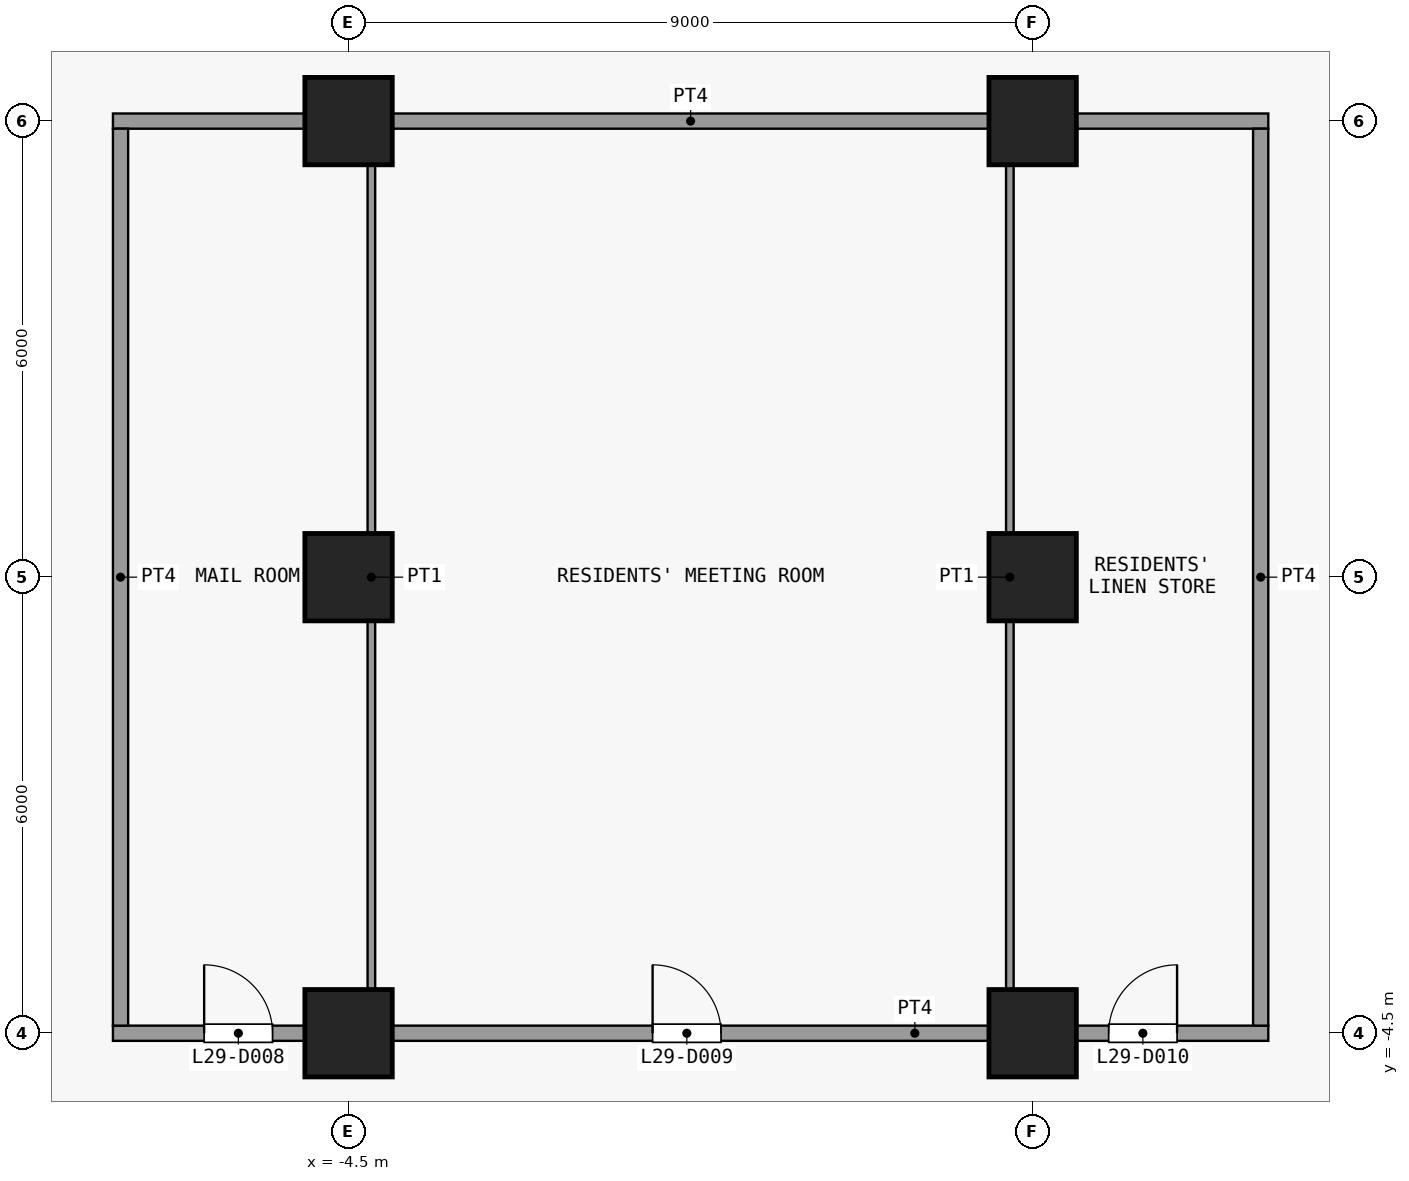
"""IFC4 building model, lengths in metres.
Left out: names, types, materials, properties, quantities, classifications, styles, units other than length and angle.
Written with IfcOpenShell. Run it as: python <this file> out.ifc"""

import sys

from ifc_helpers import new_model, si_unit, direction, frame, frame_2d, origin, origin_2d, place, context, subcontext, project, spatial, rectangle, extrude, element, fill, save


model = new_model("IFC4")
c1 = context("Model", 3, precision=1e-05, world=origin(), true_north=direction((0.0, 1.0)))
c2 = subcontext(c1, "Body", "Model", "MODEL_VIEW")
j1 = project(units=[si_unit("LENGTHUNIT", "METRE"), si_unit("PLANEANGLEUNIT", "RADIAN")], contexts=[c1])
p1 = place(None, origin())
s1 = spatial("IfcSite", under=j1, at=p1, CompositionType="ELEMENT")
p2 = place(p1, origin())
s2 = spatial("IfcBuilding", under=s1, at=p2, CompositionType="ELEMENT")
p3 = place(p2, frame((0.0, 0.0, 117.1)))
s3 = spatial("IfcBuildingStorey", under=s2, at=p3, CompositionType="ELEMENT", Elevation=117.1)
for number, where, z_axis, x_axis in (
    (1, (-4.5, -4.5, 0.0), (0.0, 0.0, 1.0), (1.0, 0.0, 0.0)),
    (2, (-4.5, 1.5, 0.0), (0.0, 0.0, 1.0), (1.0, 0.0, 0.0)),
    (3, (-4.5, 7.5, 0.0), (0.0, 0.0, 1.0), (1.0, 0.0, 0.0)),
    (4, (4.5, -4.5, 0.0), (0.0, 0.0, 1.0), (1.0, 0.0, 0.0)),
    (5, (4.5, 1.5, 0.0), (0.0, 0.0, 1.0), (1.0, 0.0, 0.0)),
    (6, (4.5, 7.5, 0.0), (0.0, 0.0, 1.0), (1.0, 0.0, 0.0)),
):
    element("IfcColumn", number, at=place(p3, frame(where, z_axis=z_axis, x_axis=x_axis)), inside=s3, PredefinedType="COLUMN", context=c2, shape_type="SweptSolid", body=[
        extrude(rectangle(XDim=1.15, YDim=1.15, at=origin_2d()), origin(), (0.0, 0.0, 1.0), 3.6),
    ])
p4 = place(p3, frame((-7.6, -4.5, 0.0), z_axis=(0.0, 0.0, 1.0), x_axis=(1.0, 0.0, 0.0)))
e7 = element("IfcWall", 7, at=p4, inside=s3, PredefinedType="PARTITIONING", context=c2, shape_type="SweptSolid", body=[
    extrude(rectangle(XDim=15.2, YDim=0.2, at=frame_2d((7.6, 0.0))), origin(), (0.0, 0.0, 1.0), 3.3),
])
p5 = place(p4, frame((1.2, 0.0, 0.0)))
e8 = element("IfcOpeningElement", 8, at=p5, cuts=e7, PredefinedType="OPENING", context=c2, shape_type="SweptSolid", body=[
    extrude(rectangle(XDim=0.9, YDim=2.1, at=frame_2d((0.45, 1.05))), frame((0.0, 0.11, 0.0), z_axis=(0.0, -1.0, 0.0), x_axis=(1.0, 0.0, 0.0)), (0.0, 0.0, 1.0), 0.22),
])
p6 = place(p4, frame((7.1, 0.0, 0.0)))
e9 = element("IfcOpeningElement", 9, at=p6, cuts=e7, PredefinedType="OPENING", context=c2, shape_type="SweptSolid", body=[
    extrude(rectangle(XDim=0.9, YDim=2.1, at=frame_2d((0.45, 1.05))), frame((0.0, 0.11, 0.0), z_axis=(0.0, -1.0, 0.0), x_axis=(1.0, 0.0, 0.0)), (0.0, 0.0, 1.0), 0.22),
])
p7 = place(p4, frame((13.1, 0.0, 0.0)))
e10 = element("IfcOpeningElement", 10, at=p7, cuts=e7, PredefinedType="OPENING", context=c2, shape_type="SweptSolid", body=[
    extrude(rectangle(XDim=0.9, YDim=2.1, at=frame_2d((0.45, 1.05))), frame((0.0, 0.11, 0.0), z_axis=(0.0, -1.0, 0.0), x_axis=(1.0, 0.0, 0.0)), (0.0, 0.0, 1.0), 0.22),
])
p8 = place(p3, frame((-7.6, 7.5, 0.0), z_axis=(0.0, 0.0, 1.0), x_axis=(1.0, 0.0, 0.0)))
e11 = element("IfcWall", 11, at=p8, inside=s3, PredefinedType="PARTITIONING", context=c2, shape_type="SweptSolid", body=[
    extrude(rectangle(XDim=15.2, YDim=0.2, at=frame_2d((7.6, 0.0))), origin(), (0.0, 0.0, 1.0), 3.3),
])
p9 = place(p3, frame((-7.5, -4.4, 0.0), z_axis=(0.0, 0.0, 1.0), x_axis=(0.0, 1.0, 0.0)))
e12 = element("IfcWall", 12, at=p9, inside=s3, PredefinedType="PARTITIONING", context=c2, shape_type="SweptSolid", body=[
    extrude(rectangle(XDim=11.8, YDim=0.2, at=frame_2d((5.9, 0.0))), origin(), (0.0, 0.0, 1.0), 3.3),
])
for number, where, z_axis, x_axis in (
    (13, (-4.2, -4.4, 0.0), (0.0, 0.0, 1.0), (0.0, 1.0, 0.0)),
    (14, (4.2, -4.4, 0.0), (0.0, 0.0, 1.0), (0.0, 1.0, 0.0)),
):
    element("IfcWall", number, at=place(p3, frame(where, z_axis=z_axis, x_axis=x_axis)), inside=s3, PredefinedType="PARTITIONING", context=c2, shape_type="SweptSolid", body=[
        extrude(rectangle(XDim=11.8, YDim=0.1, at=frame_2d((5.9, 0.0))), origin(), (0.0, 0.0, 1.0), 3.3),
    ])
p10 = place(p3, frame((7.5, -4.4, 0.0), z_axis=(0.0, 0.0, 1.0), x_axis=(0.0, 1.0, 0.0)))
e15 = element("IfcWall", 15, at=p10, inside=s3, PredefinedType="PARTITIONING", context=c2, shape_type="SweptSolid", body=[
    extrude(rectangle(XDim=11.8, YDim=0.2, at=frame_2d((5.9, 0.0))), origin(), (0.0, 0.0, 1.0), 3.3),
])
p11 = place(p5, origin())
e16 = element("IfcDoor", 16, at=p11, inside=s3, OperationType="SINGLE_SWING_RIGHT", PredefinedType="DOOR", context=c2, shape_type="SweptSolid", body=[
    extrude(rectangle(XDim=0.9, YDim=2.1, at=frame_2d((0.45, 1.05))), frame((0.0, 0.025, 0.0), z_axis=(0.0, -1.0, 0.0), x_axis=(1.0, 0.0, 0.0)), (0.0, 0.0, 1.0), 0.05),
])
fill(e8, e16)
p12 = place(p6, origin())
e17 = element("IfcDoor", 17, at=p12, inside=s3, OperationType="SINGLE_SWING_RIGHT", PredefinedType="DOOR", context=c2, shape_type="SweptSolid", body=[
    extrude(rectangle(XDim=0.9, YDim=2.1, at=frame_2d((0.45, 1.05))), frame((0.0, 0.025, 0.0), z_axis=(0.0, -1.0, 0.0), x_axis=(1.0, 0.0, 0.0)), (0.0, 0.0, 1.0), 0.05),
])
fill(e9, e17)
p13 = place(p7, origin())
e18 = element("IfcDoor", 18, at=p13, inside=s3, OperationType="SINGLE_SWING_LEFT", PredefinedType="DOOR", context=c2, shape_type="SweptSolid", body=[
    extrude(rectangle(XDim=0.9, YDim=2.1, at=frame_2d((0.45, 1.05))), frame((0.0, 0.025, 0.0), z_axis=(0.0, -1.0, 0.0), x_axis=(1.0, 0.0, 0.0)), (0.0, 0.0, 1.0), 0.05),
])
fill(e10, e18)
save(model, sys.argv[1])
